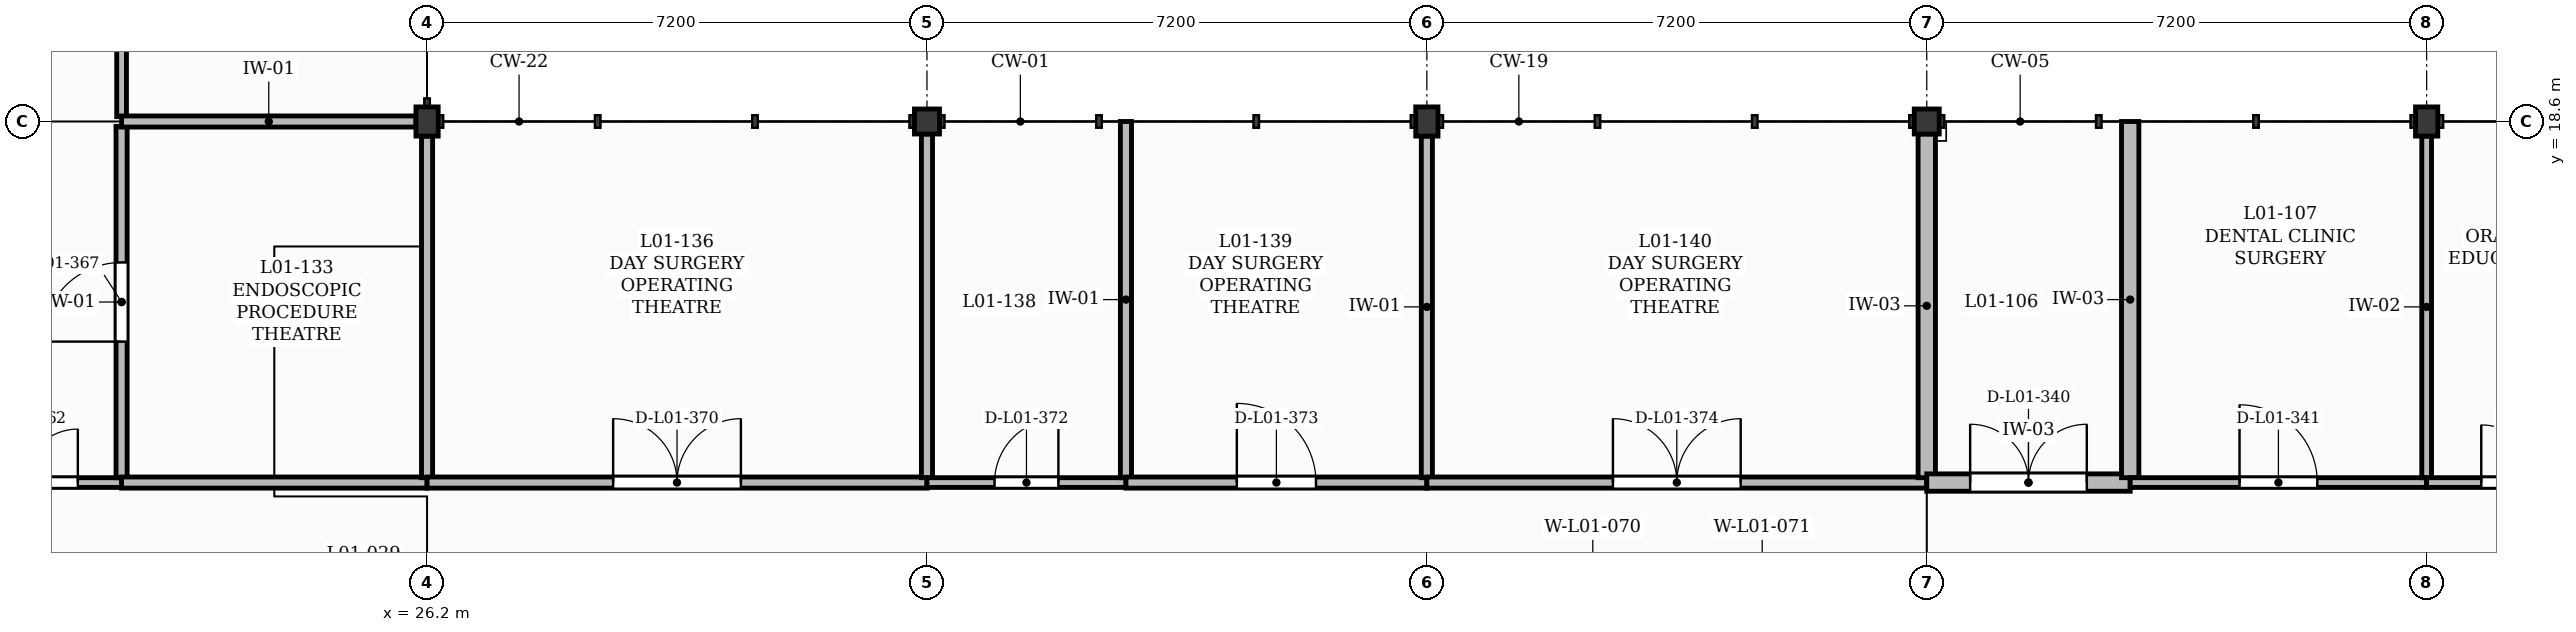
"""IFC4 building model, lengths in metres.
Left out: names, types, materials, properties, quantities, classifications, styles, units other than length and angle.
Written with IfcOpenShell. Run it as: python <this file> out.ifc"""

import sys

from ifc_helpers import new_model, si_unit, direction, frame, frame_2d, origin, origin_2d, place, context, subcontext, project, spatial, rectangle, extrude, element, fill, save


model = new_model("IFC4")
c1 = context("Model", 3, precision=1e-05, world=origin(), true_north=direction((0.0, 1.0)))
c2 = subcontext(c1, "Body", "Model", "MODEL_VIEW")
j1 = project(units=[si_unit("LENGTHUNIT", "METRE"), si_unit("PLANEANGLEUNIT", "RADIAN")], contexts=[c1])
p1 = place(None, origin())
s1 = spatial("IfcSite", under=j1, at=p1, CompositionType="ELEMENT")
p2 = place(p1, origin())
s2 = spatial("IfcBuilding", under=s1, at=p2, CompositionType="ELEMENT")
p3 = place(p2, frame((0.0, 0.0, 4.5)))
s3 = spatial("IfcBuildingStorey", under=s2, at=p3, CompositionType="ELEMENT", Elevation=4.5)
p4 = place(p3, frame((26.2, 18.6, 0.0), z_axis=(0.0, 0.0, 1.0), x_axis=(1.0, 0.0, 0.0)))
e1 = element("IfcColumn", 1, at=p4, inside=s3, PredefinedType="COLUMN", context=c2, shape_type="SweptSolid", body=[
    extrude(rectangle(XDim=0.32, YDim=0.42, at=origin_2d()), origin(), (0.0, 0.0, 1.0), 4.26),
])
p5 = place(p3, frame((33.4, 18.6, 0.0), z_axis=(0.0, 0.0, 1.0), x_axis=(1.0, 0.0, 0.0)))
e2 = element("IfcColumn", 2, at=p5, inside=s3, PredefinedType="COLUMN", context=c2, shape_type="SweptSolid", body=[
    extrude(rectangle(XDim=0.36, YDim=0.36, at=origin_2d()), origin(), (0.0, 0.0, 1.0), 4.26),
])
p6 = place(p3, frame((40.6, 18.6, 0.0), z_axis=(0.0, 0.0, 1.0), x_axis=(1.0, 0.0, 0.0)))
e3 = element("IfcColumn", 3, at=p6, inside=s3, PredefinedType="COLUMN", context=c2, shape_type="SweptSolid", body=[
    extrude(rectangle(XDim=0.32, YDim=0.42, at=origin_2d()), origin(), (0.0, 0.0, 1.0), 4.26),
])
p7 = place(p3, frame((47.8, 18.6, 0.0), z_axis=(0.0, 0.0, 1.0), x_axis=(1.0, 0.0, 0.0)))
e4 = element("IfcColumn", 4, at=p7, inside=s3, PredefinedType="COLUMN", context=c2, shape_type="SweptSolid", body=[
    extrude(rectangle(XDim=0.36, YDim=0.36, at=origin_2d()), origin(), (0.0, 0.0, 1.0), 4.26),
])
p8 = place(p3, frame((55.0, 18.6, 0.0), z_axis=(0.0, 0.0, 1.0), x_axis=(1.0, 0.0, 0.0)))
e5 = element("IfcColumn", 5, at=p8, inside=s3, PredefinedType="COLUMN", context=c2, shape_type="SweptSolid", body=[
    extrude(rectangle(XDim=0.32, YDim=0.42, at=origin_2d()), origin(), (0.0, 0.0, 1.0), 4.26),
])
p9 = place(p3, frame((19.0, 13.4, 0.0), z_axis=(0.0, 0.0, 1.0), x_axis=(1.0, 0.0, 0.0)))
e6 = element("IfcWall", 6, at=p9, inside=s3, PredefinedType="PARTITIONING", context=c2, shape_type="SweptSolid", body=[
    extrude(rectangle(XDim=2.8, YDim=0.14, at=frame_2d((1.4, 0.0))), origin(), (0.0, 0.0, 1.0), 4.18),
])
p10 = place(p9, frame((0.63, 0.0, 0.0)))
e7 = element("IfcOpeningElement", 7, at=p10, cuts=e6, PredefinedType="OPENING", context=c2, shape_type="SweptSolid", body=[
    extrude(rectangle(XDim=1.54, YDim=2.25, at=frame_2d((0.77, 1.125))), frame((0.0, 0.08, 0.0), z_axis=(0.0, -1.0, 0.0), x_axis=(1.0, 0.0, 0.0)), (0.0, 0.0, 1.0), 0.16),
])
p11 = place(p3, frame((21.8, 13.47, 0.0), z_axis=(0.0, 0.0, 1.0), x_axis=(0.0, 1.0, 0.0)))
e8 = element("IfcWall", 8, at=p11, inside=s3, PredefinedType="PARTITIONING", context=c2, shape_type="SweptSolid", body=[
    extrude(rectangle(XDim=5.06, YDim=0.16, at=frame_2d((2.53, 0.0))), origin(), (0.0, 0.0, 1.0), 4.18),
])
p12 = place(p11, frame((1.96, 0.0, 0.0)))
e9 = element("IfcOpeningElement", 9, at=p12, cuts=e8, PredefinedType="OPENING", context=c2, shape_type="SweptSolid", body=[
    extrude(rectangle(XDim=1.14, YDim=2.15, at=frame_2d((0.57, 1.075))), frame((0.0, 0.09, 0.0), z_axis=(0.0, -1.0, 0.0), x_axis=(1.0, 0.0, 0.0)), (0.0, 0.0, 1.0), 0.18),
])
p13 = place(p3, frame((21.8, 13.4, 0.0), z_axis=(0.0, 0.0, 1.0), x_axis=(1.0, 0.0, 0.0)))
e10 = element("IfcWall", 10, at=p13, inside=s3, PredefinedType="PARTITIONING", context=c2, shape_type="SweptSolid", body=[
    extrude(rectangle(XDim=4.4, YDim=0.16, at=frame_2d((2.2, 0.0))), origin(), (0.0, 0.0, 1.0), 4.18),
])
p14 = place(p3, frame((21.8, 18.67, 0.0), z_axis=(0.0, 0.0, 1.0), x_axis=(0.0, 1.0, 0.0)))
e11 = element("IfcWall", 11, at=p14, inside=s3, PredefinedType="PARTITIONING", context=c2, shape_type="SweptSolid", body=[
    extrude(rectangle(XDim=8.46, YDim=0.14, at=frame_2d((4.23, 0.0))), origin(), (0.0, 0.0, 1.0), 4.18),
])
p15 = place(p14, frame((3.4, 0.0, 0.0)))
e12 = element("IfcOpeningElement", 12, at=p15, cuts=e11, PredefinedType="OPENING", context=c2, shape_type="SweptSolid", body=[
    extrude(rectangle(XDim=1.66, YDim=2.3, at=frame_2d((0.83, 1.15))), frame((0.0, 0.08, 0.0), z_axis=(0.0, -1.0, 0.0), x_axis=(1.0, 0.0, 0.0)), (0.0, 0.0, 1.0), 0.16),
])
p16 = place(p3, frame((21.8, 18.6, 0.0), z_axis=(0.0, 0.0, 1.0), x_axis=(1.0, 0.0, 0.0)))
e13 = element("IfcWall", 13, at=p16, inside=s3, PredefinedType="PARTITIONING", context=c2, shape_type="SweptSolid", body=[
    extrude(rectangle(XDim=4.24, YDim=0.16, at=frame_2d((2.12, 0.0))), origin(), (0.0, 0.0, 1.0), 3.62),
])
p17 = place(p3, frame((26.2, 13.47, 0.0), z_axis=(0.0, 0.0, 1.0), x_axis=(0.0, 1.0, 0.0)))
e14 = element("IfcWall", 14, at=p17, inside=s3, PredefinedType="PARTITIONING", context=c2, shape_type="SweptSolid", body=[
    extrude(rectangle(XDim=4.92, YDim=0.16, at=frame_2d((2.46, 0.0))), origin(), (0.0, 0.0, 1.0), 3.74),
])
p18 = place(p3, frame((26.2, 13.4, 0.0), z_axis=(0.0, 0.0, 1.0), x_axis=(1.0, 0.0, 0.0)))
e15 = element("IfcWall", 15, at=p18, inside=s3, PredefinedType="PARTITIONING", context=c2, shape_type="SweptSolid", body=[
    extrude(rectangle(XDim=7.2, YDim=0.16, at=frame_2d((3.6, 0.0))), origin(), (0.0, 0.0, 1.0), 4.18),
])
p19 = place(p18, frame((2.68, 0.0, 0.0)))
e16 = element("IfcOpeningElement", 16, at=p19, cuts=e15, PredefinedType="OPENING", context=c2, shape_type="SweptSolid", body=[
    extrude(rectangle(XDim=1.84, YDim=2.35, at=frame_2d((0.92, 1.175))), frame((0.0, 0.09, 0.0), z_axis=(0.0, -1.0, 0.0), x_axis=(1.0, 0.0, 0.0)), (0.0, 0.0, 1.0), 0.18),
])
p20 = place(p3, frame((33.4, 13.47, 0.0), z_axis=(0.0, 0.0, 1.0), x_axis=(0.0, 1.0, 0.0)))
e17 = element("IfcWall", 17, at=p20, inside=s3, PredefinedType="PARTITIONING", context=c2, shape_type="SweptSolid", body=[
    extrude(rectangle(XDim=4.95, YDim=0.16, at=frame_2d((2.475, 0.0))), origin(), (0.0, 0.0, 1.0), 3.74),
])
p21 = place(p3, frame((33.4, 13.4, 0.0), z_axis=(0.0, 0.0, 1.0), x_axis=(1.0, 0.0, 0.0)))
e18 = element("IfcWall", 18, at=p21, inside=s3, PredefinedType="PARTITIONING", context=c2, shape_type="SweptSolid", body=[
    extrude(rectangle(XDim=2.866, YDim=0.14, at=frame_2d((1.433, 0.0))), origin(), (0.0, 0.0, 1.0), 4.18),
])
p22 = place(p21, frame((0.973, 0.0, 0.0)))
e19 = element("IfcOpeningElement", 19, at=p22, cuts=e18, PredefinedType="OPENING", context=c2, shape_type="SweptSolid", body=[
    extrude(rectangle(XDim=0.92, YDim=2.1, at=frame_2d((0.46, 1.05))), frame((0.0, 0.08, 0.0), z_axis=(0.0, -1.0, 0.0), x_axis=(1.0, 0.0, 0.0)), (0.0, 0.0, 1.0), 0.16),
])
p23 = place(p3, frame((36.266, 13.47, 0.0), z_axis=(0.0, 0.0, 1.0), x_axis=(0.0, 1.0, 0.0)))
e20 = element("IfcWall", 20, at=p23, inside=s3, PredefinedType="PARTITIONING", context=c2, shape_type="SweptSolid", body=[
    extrude(rectangle(XDim=5.13, YDim=0.16, at=frame_2d((2.565, 0.0))), origin(), (0.0, 0.0, 1.0), 4.18),
])
p24 = place(p3, frame((36.266, 13.4, 0.0), z_axis=(0.0, 0.0, 1.0), x_axis=(1.0, 0.0, 0.0)))
e21 = element("IfcWall", 21, at=p24, inside=s3, PredefinedType="PARTITIONING", context=c2, shape_type="SweptSolid", body=[
    extrude(rectangle(XDim=4.334, YDim=0.16, at=frame_2d((2.167, 0.0))), origin(), (0.0, 0.0, 1.0), 4.18),
])
p25 = place(p24, frame((1.597, 0.0, 0.0)))
e22 = element("IfcOpeningElement", 22, at=p25, cuts=e21, PredefinedType="OPENING", context=c2, shape_type="SweptSolid", body=[
    extrude(rectangle(XDim=1.14, YDim=2.15, at=frame_2d((0.57, 1.075))), frame((0.0, 0.09, 0.0), z_axis=(0.0, -1.0, 0.0), x_axis=(1.0, 0.0, 0.0)), (0.0, 0.0, 1.0), 0.18),
])
p26 = place(p3, frame((40.6, 13.47, 0.0), z_axis=(0.0, 0.0, 1.0), x_axis=(0.0, 1.0, 0.0)))
e23 = element("IfcWall", 23, at=p26, inside=s3, PredefinedType="PARTITIONING", context=c2, shape_type="SweptSolid", body=[
    extrude(rectangle(XDim=4.92, YDim=0.16, at=frame_2d((2.46, 0.0))), origin(), (0.0, 0.0, 1.0), 3.74),
])
p27 = place(p3, frame((40.6, 13.4, 0.0), z_axis=(0.0, 0.0, 1.0), x_axis=(1.0, 0.0, 0.0)))
e24 = element("IfcWall", 24, at=p27, inside=s3, PredefinedType="PARTITIONING", context=c2, shape_type="SweptSolid", body=[
    extrude(rectangle(XDim=7.2, YDim=0.16, at=frame_2d((3.6, 0.0))), origin(), (0.0, 0.0, 1.0), 4.18),
])
p28 = place(p27, frame((2.68, 0.0, 0.0)))
e25 = element("IfcOpeningElement", 25, at=p28, cuts=e24, PredefinedType="OPENING", context=c2, shape_type="SweptSolid", body=[
    extrude(rectangle(XDim=1.84, YDim=2.35, at=frame_2d((0.92, 1.175))), frame((0.0, 0.09, 0.0), z_axis=(0.0, -1.0, 0.0), x_axis=(1.0, 0.0, 0.0)), (0.0, 0.0, 1.0), 0.18),
])
p29 = place(p3, frame((47.8, 13.47, 0.0), z_axis=(0.0, 0.0, 1.0), x_axis=(0.0, 1.0, 0.0)))
e26 = element("IfcWall", 26, at=p29, inside=s3, PredefinedType="SOLIDWALL", context=c2, shape_type="SweptSolid", body=[
    extrude(rectangle(XDim=4.95, YDim=0.25, at=frame_2d((2.475, 0.0))), origin(), (0.0, 0.0, 1.0), 3.74),
])
p30 = place(p3, frame((47.8, 13.4, 0.0), z_axis=(0.0, 0.0, 1.0), x_axis=(1.0, 0.0, 0.0)))
e27 = element("IfcWall", 27, at=p30, inside=s3, PredefinedType="SOLIDWALL", context=c2, shape_type="SweptSolid", body=[
    extrude(rectangle(XDim=2.93, YDim=0.25, at=frame_2d((1.465, 0.0))), origin(), (0.0, 0.0, 1.0), 4.18),
])
p31 = place(p30, frame((0.625, 0.0, 0.0)))
e28 = element("IfcOpeningElement", 28, at=p31, cuts=e27, PredefinedType="OPENING", context=c2, shape_type="SweptSolid", body=[
    extrude(rectangle(XDim=1.68, YDim=2.3, at=frame_2d((0.84, 1.15))), frame((0.0, 0.135, 0.0), z_axis=(0.0, -1.0, 0.0), x_axis=(1.0, 0.0, 0.0)), (0.0, 0.0, 1.0), 0.27),
])
p32 = place(p3, frame((50.73, 13.47, 0.0), z_axis=(0.0, 0.0, 1.0), x_axis=(0.0, 1.0, 0.0)))
e29 = element("IfcWall", 29, at=p32, inside=s3, PredefinedType="SOLIDWALL", context=c2, shape_type="SweptSolid", body=[
    extrude(rectangle(XDim=5.13, YDim=0.25, at=frame_2d((2.565, 0.0))), origin(), (0.0, 0.0, 1.0), 4.18),
])
p33 = place(p3, frame((50.73, 13.4, 0.0), z_axis=(0.0, 0.0, 1.0), x_axis=(1.0, 0.0, 0.0)))
e30 = element("IfcWall", 30, at=p33, inside=s3, PredefinedType="PARTITIONING", context=c2, shape_type="SweptSolid", body=[
    extrude(rectangle(XDim=4.27, YDim=0.14, at=frame_2d((2.135, 0.0))), origin(), (0.0, 0.0, 1.0), 4.18),
])
p34 = place(p33, frame((1.575, 0.0, 0.0)))
e31 = element("IfcOpeningElement", 31, at=p34, cuts=e30, PredefinedType="OPENING", context=c2, shape_type="SweptSolid", body=[
    extrude(rectangle(XDim=1.12, YDim=2.15, at=frame_2d((0.56, 1.075))), frame((0.0, 0.08, 0.0), z_axis=(0.0, -1.0, 0.0), x_axis=(1.0, 0.0, 0.0)), (0.0, 0.0, 1.0), 0.16),
])
p35 = place(p3, frame((55.0, 13.47, 0.0), z_axis=(0.0, 0.0, 1.0), x_axis=(0.0, 1.0, 0.0)))
e32 = element("IfcWall", 32, at=p35, inside=s3, PredefinedType="PARTITIONING", context=c2, shape_type="SweptSolid", body=[
    extrude(rectangle(XDim=4.92, YDim=0.14, at=frame_2d((2.46, 0.0))), origin(), (0.0, 0.0, 1.0), 3.74),
])
p36 = place(p3, frame((55.0, 13.4, 0.0), z_axis=(0.0, 0.0, 1.0), x_axis=(1.0, 0.0, 0.0)))
e33 = element("IfcWall", 33, at=p36, inside=s3, PredefinedType="PARTITIONING", context=c2, shape_type="SweptSolid", body=[
    extrude(rectangle(XDim=3.233, YDim=0.14, at=frame_2d((1.616, 0.0))), origin(), (0.0, 0.0, 1.0), 4.18),
])
p37 = place(p36, frame((0.787, 0.0, 0.0)))
e34 = element("IfcOpeningElement", 34, at=p37, cuts=e33, PredefinedType="OPENING", context=c2, shape_type="SweptSolid", body=[
    extrude(rectangle(XDim=1.66, YDim=2.3, at=frame_2d((0.83, 1.15))), frame((0.0, 0.08, 0.0), z_axis=(0.0, -1.0, 0.0), x_axis=(1.0, 0.0, 0.0)), (0.0, 0.0, 1.0), 0.16),
])
p38 = place(p10, origin())
e35 = element("IfcDoor", 35, at=p38, inside=s3, OperationType="DOUBLE_DOOR_SINGLE_SWING", PredefinedType="DOOR", context=c2, shape_type="SweptSolid", body=[
    extrude(rectangle(XDim=1.54, YDim=2.25, at=frame_2d((0.77, 1.125))), frame((0.0, 0.025, 0.0), z_axis=(0.0, -1.0, 0.0), x_axis=(1.0, 0.0, 0.0)), (0.0, 0.0, 1.0), 0.05),
])
fill(e7, e35)
p39 = place(p31, origin())
e36 = element("IfcDoor", 36, at=p39, inside=s3, OperationType="DOUBLE_DOOR_SINGLE_SWING", PredefinedType="DOOR", context=c2, shape_type="SweptSolid", body=[
    extrude(rectangle(XDim=1.68, YDim=2.3, at=frame_2d((0.84, 1.15))), frame((0.0, 0.025, 0.0), z_axis=(0.0, -1.0, 0.0), x_axis=(1.0, 0.0, 0.0)), (0.0, 0.0, 1.0), 0.05),
])
fill(e28, e36)
p40 = place(p34, origin())
e37 = element("IfcDoor", 37, at=p40, inside=s3, OperationType="SINGLE_SWING_LEFT", PredefinedType="DOOR", context=c2, shape_type="SweptSolid", body=[
    extrude(rectangle(XDim=1.12, YDim=2.15, at=frame_2d((0.56, 1.075))), frame((0.0, 0.025, 0.0), z_axis=(0.0, -1.0, 0.0), x_axis=(1.0, 0.0, 0.0)), (0.0, 0.0, 1.0), 0.05),
])
fill(e31, e37)
p41 = place(p37, origin())
e38 = element("IfcDoor", 38, at=p41, inside=s3, OperationType="DOUBLE_DOOR_SINGLE_SWING", PredefinedType="DOOR", context=c2, shape_type="SweptSolid", body=[
    extrude(rectangle(XDim=1.66, YDim=2.3, at=frame_2d((0.83, 1.15))), frame((0.0, 0.025, 0.0), z_axis=(0.0, -1.0, 0.0), x_axis=(1.0, 0.0, 0.0)), (0.0, 0.0, 1.0), 0.05),
])
fill(e34, e38)
p42 = place(p12, origin())
e39 = element("IfcDoor", 39, at=p42, inside=s3, OperationType="SINGLE_SWING_LEFT", PredefinedType="DOOR", context=c2, shape_type="SweptSolid", body=[
    extrude(rectangle(XDim=1.14, YDim=2.15, at=frame_2d((0.57, 1.075))), frame((0.0, 0.025, 0.0), z_axis=(0.0, -1.0, 0.0), x_axis=(1.0, 0.0, 0.0)), (0.0, 0.0, 1.0), 0.05),
])
fill(e9, e39)
p43 = place(p19, origin())
e40 = element("IfcDoor", 40, at=p43, inside=s3, OperationType="DOUBLE_DOOR_SINGLE_SWING", PredefinedType="DOOR", context=c2, shape_type="SweptSolid", body=[
    extrude(rectangle(XDim=1.84, YDim=2.35, at=frame_2d((0.92, 1.175))), frame((0.0, 0.025, 0.0), z_axis=(0.0, -1.0, 0.0), x_axis=(1.0, 0.0, 0.0)), (0.0, 0.0, 1.0), 0.05),
])
fill(e16, e40)
p44 = place(p22, origin())
e41 = element("IfcDoor", 41, at=p44, inside=s3, OperationType="SINGLE_SWING_RIGHT", PredefinedType="DOOR", context=c2, shape_type="SweptSolid", body=[
    extrude(rectangle(XDim=0.92, YDim=2.1, at=frame_2d((0.46, 1.05))), frame((0.0, 0.025, 0.0), z_axis=(0.0, -1.0, 0.0), x_axis=(1.0, 0.0, 0.0)), (0.0, 0.0, 1.0), 0.05),
])
fill(e19, e41)
p45 = place(p25, origin())
e42 = element("IfcDoor", 42, at=p45, inside=s3, OperationType="SINGLE_SWING_LEFT", PredefinedType="DOOR", context=c2, shape_type="SweptSolid", body=[
    extrude(rectangle(XDim=1.14, YDim=2.15, at=frame_2d((0.57, 1.075))), frame((0.0, 0.025, 0.0), z_axis=(0.0, -1.0, 0.0), x_axis=(1.0, 0.0, 0.0)), (0.0, 0.0, 1.0), 0.05),
])
fill(e22, e42)
p46 = place(p28, origin())
e43 = element("IfcDoor", 43, at=p46, inside=s3, OperationType="DOUBLE_DOOR_SINGLE_SWING", PredefinedType="DOOR", context=c2, shape_type="SweptSolid", body=[
    extrude(rectangle(XDim=1.84, YDim=2.35, at=frame_2d((0.92, 1.175))), frame((0.0, 0.025, 0.0), z_axis=(0.0, -1.0, 0.0), x_axis=(1.0, 0.0, 0.0)), (0.0, 0.0, 1.0), 0.05),
])
fill(e25, e43)
save(model, sys.argv[1])
